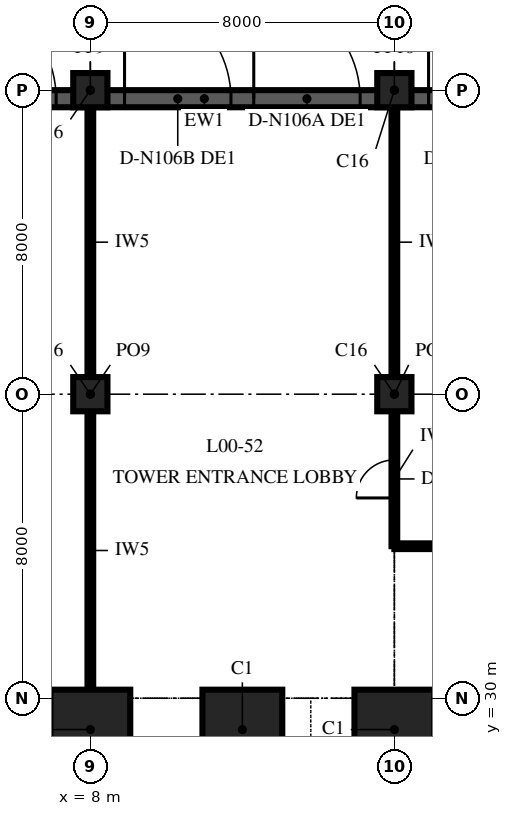
"""IFC4 building model, lengths in metres.
Left out: names, types, materials, properties, quantities, classifications, styles, units other than length and angle.
Written with IfcOpenShell. Run it as: python <this file> out.ifc"""

import sys

from ifc_helpers import new_model, si_unit, direction, frame, frame_2d, origin, origin_2d, place, context, subcontext, project, spatial, rectangle, extrude, element, fill, save


model = new_model("IFC4")
c1 = context("Model", 3, precision=1e-05, world=origin(), true_north=direction((0.0, 1.0)))
c2 = subcontext(c1, "Body", "Model", "MODEL_VIEW")
j1 = project(units=[si_unit("LENGTHUNIT", "METRE"), si_unit("PLANEANGLEUNIT", "RADIAN")], contexts=[c1])
p1 = place(None, origin())
s1 = spatial("IfcSite", under=j1, at=p1, CompositionType="ELEMENT")
p2 = place(p1, origin())
s2 = spatial("IfcBuilding", under=s1, at=p2, CompositionType="ELEMENT")
p3 = place(p2, origin())
s3 = spatial("IfcBuildingStorey", under=s2, at=p3, CompositionType="ELEMENT", Elevation=0.0)
for number, where, z_axis, x_axis in (
    (1, (16.0, 29.175, 0.0), (0.0, 0.0, 1.0), (-1.0, 0.0, 0.0)),
    (2, (12.0, 29.175, 0.0), (0.0, 0.0, 1.0), (-1.0, 0.0, 0.0)),
    (3, (8.0, 29.175, 0.0), (0.0, 0.0, 1.0), (-1.0, 0.0, 0.0)),
):
    element("IfcColumn", number, at=place(p3, frame(where, z_axis=z_axis, x_axis=x_axis)), inside=s3, PredefinedType="COLUMN", context=c2, shape_type="SweptSolid", body=[
        extrude(rectangle(XDim=2.1, YDim=2.1, at=origin_2d()), origin(), (0.0, 0.0, 1.0), 6.0),
    ])
for number, where, z_axis, x_axis in (
    (4, (8.0, 38.0, 0.0), (0.0, 0.0, 1.0), (1.0, 0.0, 0.0)),
    (5, (8.0, 46.0, 0.0), (0.0, 0.0, 1.0), (1.0, 0.0, 0.0)),
    (6, (16.0, 38.0, 0.0), (0.0, 0.0, 1.0), (1.0, 0.0, 0.0)),
    (7, (16.0, 46.0, 0.0), (0.0, 0.0, 1.0), (1.0, 0.0, 0.0)),
):
    element("IfcColumn", number, at=place(p3, frame(where, z_axis=z_axis, x_axis=x_axis)), inside=s3, PredefinedType="COLUMN", context=c2, shape_type="SweptSolid", body=[
        extrude(rectangle(XDim=0.9, YDim=0.9, at=origin_2d()), origin(), (0.0, 0.0, 1.0), 6.0),
    ])
p4 = place(p3, frame((56.0, 45.775, 0.0), z_axis=(0.0, 0.0, 1.0), x_axis=(-1.0, 0.0, 0.0)))
e8 = element("IfcWall", 8, at=p4, inside=s3, PredefinedType="SOLIDWALL", context=c2, shape_type="SweptSolid", body=[
    extrude(rectangle(XDim=90.0, YDim=0.45, at=frame_2d((45.0, 0.0))), origin(), (0.0, 0.0, 1.0), 6.0),
])
p5 = place(p4, frame((0.9, 0.0, 0.0)))
e9 = element("IfcOpeningElement", 9, at=p5, cuts=e8, PredefinedType="OPENING", context=c2, shape_type="SweptSolid", body=[
    extrude(rectangle(XDim=2.8, YDim=2.4, at=frame_2d((1.4, 1.2))), frame((0.0, 0.24, 0.0), z_axis=(0.0, -1.0, 0.0), x_axis=(1.0, 0.0, 0.0)), (0.0, 0.0, 1.0), 0.48),
])
p6 = place(p4, frame((4.3, 0.0, 0.0)))
e10 = element("IfcOpeningElement", 10, at=p6, cuts=e8, PredefinedType="OPENING", context=c2, shape_type="SweptSolid", body=[
    extrude(rectangle(XDim=2.8, YDim=2.4, at=frame_2d((1.4, 1.2))), frame((0.0, 0.24, 0.0), z_axis=(0.0, -1.0, 0.0), x_axis=(1.0, 0.0, 0.0)), (0.0, 0.0, 1.0), 0.48),
])
p7 = place(p4, frame((8.9, 0.0, 0.0)))
e11 = element("IfcOpeningElement", 11, at=p7, cuts=e8, PredefinedType="OPENING", context=c2, shape_type="SweptSolid", body=[
    extrude(rectangle(XDim=2.8, YDim=2.4, at=frame_2d((1.4, 1.2))), frame((0.0, 0.24, 0.0), z_axis=(0.0, -1.0, 0.0), x_axis=(1.0, 0.0, 0.0)), (0.0, 0.0, 1.0), 0.48),
])
p8 = place(p4, frame((12.3, 0.0, 0.0)))
e12 = element("IfcOpeningElement", 12, at=p8, cuts=e8, PredefinedType="OPENING", context=c2, shape_type="SweptSolid", body=[
    extrude(rectangle(XDim=2.8, YDim=2.4, at=frame_2d((1.4, 1.2))), frame((0.0, 0.24, 0.0), z_axis=(0.0, -1.0, 0.0), x_axis=(1.0, 0.0, 0.0)), (0.0, 0.0, 1.0), 0.48),
])
p9 = place(p4, frame((16.9, 0.0, 0.0)))
e13 = element("IfcOpeningElement", 13, at=p9, cuts=e8, PredefinedType="OPENING", context=c2, shape_type="SweptSolid", body=[
    extrude(rectangle(XDim=2.8, YDim=2.4, at=frame_2d((1.4, 1.2))), frame((0.0, 0.24, 0.0), z_axis=(0.0, -1.0, 0.0), x_axis=(1.0, 0.0, 0.0)), (0.0, 0.0, 1.0), 0.48),
])
p10 = place(p4, frame((20.3, 0.0, 0.0)))
e14 = element("IfcOpeningElement", 14, at=p10, cuts=e8, PredefinedType="OPENING", context=c2, shape_type="SweptSolid", body=[
    extrude(rectangle(XDim=2.8, YDim=2.4, at=frame_2d((1.4, 1.2))), frame((0.0, 0.24, 0.0), z_axis=(0.0, -1.0, 0.0), x_axis=(1.0, 0.0, 0.0)), (0.0, 0.0, 1.0), 0.48),
])
p11 = place(p4, frame((24.9, 0.0, 0.0)))
e15 = element("IfcOpeningElement", 15, at=p11, cuts=e8, PredefinedType="OPENING", context=c2, shape_type="SweptSolid", body=[
    extrude(rectangle(XDim=2.8, YDim=2.4, at=frame_2d((1.4, 1.2))), frame((0.0, 0.24, 0.0), z_axis=(0.0, -1.0, 0.0), x_axis=(1.0, 0.0, 0.0)), (0.0, 0.0, 1.0), 0.48),
])
p12 = place(p4, frame((28.3, 0.0, 0.0)))
e16 = element("IfcOpeningElement", 16, at=p12, cuts=e8, PredefinedType="OPENING", context=c2, shape_type="SweptSolid", body=[
    extrude(rectangle(XDim=2.8, YDim=2.4, at=frame_2d((1.4, 1.2))), frame((0.0, 0.24, 0.0), z_axis=(0.0, -1.0, 0.0), x_axis=(1.0, 0.0, 0.0)), (0.0, 0.0, 1.0), 0.48),
])
p13 = place(p4, frame((32.9, 0.0, 0.0)))
e17 = element("IfcOpeningElement", 17, at=p13, cuts=e8, PredefinedType="OPENING", context=c2, shape_type="SweptSolid", body=[
    extrude(rectangle(XDim=2.8, YDim=2.4, at=frame_2d((1.4, 1.2))), frame((0.0, 0.24, 0.0), z_axis=(0.0, -1.0, 0.0), x_axis=(1.0, 0.0, 0.0)), (0.0, 0.0, 1.0), 0.48),
])
p14 = place(p4, frame((36.3, 0.0, 0.0)))
e18 = element("IfcOpeningElement", 18, at=p14, cuts=e8, PredefinedType="OPENING", context=c2, shape_type="SweptSolid", body=[
    extrude(rectangle(XDim=2.8, YDim=2.4, at=frame_2d((1.4, 1.2))), frame((0.0, 0.24, 0.0), z_axis=(0.0, -1.0, 0.0), x_axis=(1.0, 0.0, 0.0)), (0.0, 0.0, 1.0), 0.48),
])
p15 = place(p4, frame((40.9, 0.0, 0.0)))
e19 = element("IfcOpeningElement", 19, at=p15, cuts=e8, PredefinedType="OPENING", context=c2, shape_type="SweptSolid", body=[
    extrude(rectangle(XDim=2.8, YDim=2.4, at=frame_2d((1.4, 1.2))), frame((0.0, 0.24, 0.0), z_axis=(0.0, -1.0, 0.0), x_axis=(1.0, 0.0, 0.0)), (0.0, 0.0, 1.0), 0.48),
])
p16 = place(p4, frame((44.3, 0.0, 0.0)))
e20 = element("IfcOpeningElement", 20, at=p16, cuts=e8, PredefinedType="OPENING", context=c2, shape_type="SweptSolid", body=[
    extrude(rectangle(XDim=2.8, YDim=2.4, at=frame_2d((1.4, 1.2))), frame((0.0, 0.24, 0.0), z_axis=(0.0, -1.0, 0.0), x_axis=(1.0, 0.0, 0.0)), (0.0, 0.0, 1.0), 0.48),
])
p17 = place(p4, frame((48.9, 0.0, 0.0)))
e21 = element("IfcOpeningElement", 21, at=p17, cuts=e8, PredefinedType="OPENING", context=c2, shape_type="SweptSolid", body=[
    extrude(rectangle(XDim=2.8, YDim=2.4, at=frame_2d((1.4, 1.2))), frame((0.0, 0.24, 0.0), z_axis=(0.0, -1.0, 0.0), x_axis=(1.0, 0.0, 0.0)), (0.0, 0.0, 1.0), 0.48),
])
p18 = place(p4, frame((52.3, 0.0, 0.0)))
e22 = element("IfcOpeningElement", 22, at=p18, cuts=e8, PredefinedType="OPENING", context=c2, shape_type="SweptSolid", body=[
    extrude(rectangle(XDim=2.8, YDim=2.4, at=frame_2d((1.4, 1.2))), frame((0.0, 0.24, 0.0), z_axis=(0.0, -1.0, 0.0), x_axis=(1.0, 0.0, 0.0)), (0.0, 0.0, 1.0), 0.48),
])
p19 = place(p4, frame((56.9, 0.0, 0.0)))
e23 = element("IfcOpeningElement", 23, at=p19, cuts=e8, PredefinedType="OPENING", context=c2, shape_type="SweptSolid", body=[
    extrude(rectangle(XDim=2.8, YDim=2.4, at=frame_2d((1.4, 1.2))), frame((0.0, 0.24, 0.0), z_axis=(0.0, -1.0, 0.0), x_axis=(1.0, 0.0, 0.0)), (0.0, 0.0, 1.0), 0.48),
])
p20 = place(p4, frame((60.3, 0.0, 0.0)))
e24 = element("IfcOpeningElement", 24, at=p20, cuts=e8, PredefinedType="OPENING", context=c2, shape_type="SweptSolid", body=[
    extrude(rectangle(XDim=2.8, YDim=2.4, at=frame_2d((1.4, 1.2))), frame((0.0, 0.24, 0.0), z_axis=(0.0, -1.0, 0.0), x_axis=(1.0, 0.0, 0.0)), (0.0, 0.0, 1.0), 0.48),
])
p21 = place(p4, frame((64.9, 0.0, 0.0)))
e25 = element("IfcOpeningElement", 25, at=p21, cuts=e8, PredefinedType="OPENING", context=c2, shape_type="SweptSolid", body=[
    extrude(rectangle(XDim=2.8, YDim=2.4, at=frame_2d((1.4, 1.2))), frame((0.0, 0.24, 0.0), z_axis=(0.0, -1.0, 0.0), x_axis=(1.0, 0.0, 0.0)), (0.0, 0.0, 1.0), 0.48),
])
p22 = place(p4, frame((68.3, 0.0, 0.0)))
e26 = element("IfcOpeningElement", 26, at=p22, cuts=e8, PredefinedType="OPENING", context=c2, shape_type="SweptSolid", body=[
    extrude(rectangle(XDim=2.8, YDim=2.4, at=frame_2d((1.4, 1.2))), frame((0.0, 0.24, 0.0), z_axis=(0.0, -1.0, 0.0), x_axis=(1.0, 0.0, 0.0)), (0.0, 0.0, 1.0), 0.48),
])
p23 = place(p4, frame((72.9, 0.0, 0.0)))
e27 = element("IfcOpeningElement", 27, at=p23, cuts=e8, PredefinedType="OPENING", context=c2, shape_type="SweptSolid", body=[
    extrude(rectangle(XDim=2.8, YDim=2.4, at=frame_2d((1.4, 1.2))), frame((0.0, 0.24, 0.0), z_axis=(0.0, -1.0, 0.0), x_axis=(1.0, 0.0, 0.0)), (0.0, 0.0, 1.0), 0.48),
])
p24 = place(p4, frame((76.3, 0.0, 0.0)))
e28 = element("IfcOpeningElement", 28, at=p24, cuts=e8, PredefinedType="OPENING", context=c2, shape_type="SweptSolid", body=[
    extrude(rectangle(XDim=2.8, YDim=2.4, at=frame_2d((1.4, 1.2))), frame((0.0, 0.24, 0.0), z_axis=(0.0, -1.0, 0.0), x_axis=(1.0, 0.0, 0.0)), (0.0, 0.0, 1.0), 0.48),
])
p25 = place(p4, frame((80.9, 0.0, 0.0)))
e29 = element("IfcOpeningElement", 29, at=p25, cuts=e8, PredefinedType="OPENING", context=c2, shape_type="SweptSolid", body=[
    extrude(rectangle(XDim=2.8, YDim=2.4, at=frame_2d((1.4, 1.2))), frame((0.0, 0.24, 0.0), z_axis=(0.0, -1.0, 0.0), x_axis=(1.0, 0.0, 0.0)), (0.0, 0.0, 1.0), 0.48),
])
p26 = place(p4, frame((84.3, 0.0, 0.0)))
e30 = element("IfcOpeningElement", 30, at=p26, cuts=e8, PredefinedType="OPENING", context=c2, shape_type="SweptSolid", body=[
    extrude(rectangle(XDim=2.8, YDim=2.4, at=frame_2d((1.4, 1.2))), frame((0.0, 0.24, 0.0), z_axis=(0.0, -1.0, 0.0), x_axis=(1.0, 0.0, 0.0)), (0.0, 0.0, 1.0), 0.48),
])
p27 = place(p3, frame((16.0, 34.0, 0.0), z_axis=(0.0, 0.0, 1.0), x_axis=(0.0, 1.0, 0.0)))
e31 = element("IfcWall", 31, at=p27, inside=s3, PredefinedType="PARTITIONING", context=c2, shape_type="SweptSolid", body=[
    extrude(rectangle(XDim=3.54, YDim=0.15, at=frame_2d((1.77, 0.0))), origin(), (0.0, 0.0, 1.0), 5.7),
])
p28 = place(p27, frame((1.27, 0.0, 0.0)))
e32 = element("IfcOpeningElement", 32, at=p28, cuts=e31, PredefinedType="OPENING", context=c2, shape_type="SweptSolid", body=[
    extrude(rectangle(XDim=1.0, YDim=2.1, at=frame_2d((0.5, 1.05))), frame((0.0, 0.09, 0.0), z_axis=(0.0, -1.0, 0.0), x_axis=(1.0, 0.0, 0.0)), (0.0, 0.0, 1.0), 0.18),
])
p29 = place(p3, frame((16.0, 38.46, 0.0), z_axis=(0.0, 0.0, 1.0), x_axis=(0.0, 1.0, 0.0)))
e33 = element("IfcWall", 33, at=p29, inside=s3, PredefinedType="PARTITIONING", context=c2, shape_type="SweptSolid", body=[
    extrude(rectangle(XDim=7.08, YDim=0.15, at=frame_2d((3.54, 0.0))), origin(), (0.0, 0.0, 1.0), 5.05),
])
p30 = place(p3, frame((16.0, 34.0, 0.0), z_axis=(0.0, 0.0, 1.0), x_axis=(1.0, 0.0, 0.0)))
e34 = element("IfcWall", 34, at=p30, inside=s3, PredefinedType="PARTITIONING", context=c2, shape_type="SweptSolid", body=[
    extrude(rectangle(XDim=28.0, YDim=0.15, at=frame_2d((14.0, 0.0))), origin(), (0.0, 0.0, 1.0), 5.7),
])
p31 = place(p3, frame((8.0, 30.235, 0.0), z_axis=(0.0, 0.0, 1.0), x_axis=(0.0, 1.0, 0.0)))
e35 = element("IfcWall", 35, at=p31, inside=s3, PredefinedType="PARTITIONING", context=c2, shape_type="SweptSolid", body=[
    extrude(rectangle(XDim=7.305, YDim=0.15, at=frame_2d((3.652, 0.0))), origin(), (0.0, 0.0, 1.0), 5.7),
])
p32 = place(p3, frame((8.0, 38.46, 0.0), z_axis=(0.0, 0.0, 1.0), x_axis=(0.0, 1.0, 0.0)))
e36 = element("IfcWall", 36, at=p32, inside=s3, PredefinedType="PARTITIONING", context=c2, shape_type="SweptSolid", body=[
    extrude(rectangle(XDim=7.08, YDim=0.15, at=frame_2d((3.54, 0.0))), origin(), (0.0, 0.0, 1.0), 5.05),
])
p33 = place(p14, frame((2.8, 0.0, 0.0), z_axis=(0.0, 0.0, 1.0), x_axis=(-1.0, 0.0, 0.0)))
e37 = element("IfcDoor", 37, at=p33, inside=s3, OperationType="DOUBLE_DOOR_SINGLE_SWING", PredefinedType="DOOR", context=c2, shape_type="SweptSolid", body=[
    extrude(rectangle(XDim=2.8, YDim=2.4, at=frame_2d((1.4, 1.2))), frame((0.0, 0.225, 0.0), z_axis=(0.0, -1.0, 0.0), x_axis=(1.0, 0.0, 0.0)), (0.0, 0.0, 1.0), 0.449),
])
fill(e18, e37)
p34 = place(p15, frame((2.8, 0.0, 0.0), z_axis=(0.0, 0.0, 1.0), x_axis=(-1.0, 0.0, 0.0)))
e38 = element("IfcDoor", 38, at=p34, inside=s3, OperationType="DOUBLE_DOOR_SINGLE_SWING", PredefinedType="DOOR", context=c2, shape_type="SweptSolid", body=[
    extrude(rectangle(XDim=2.8, YDim=2.4, at=frame_2d((1.4, 1.2))), frame((0.0, 0.225, 0.0), z_axis=(0.0, -1.0, 0.0), x_axis=(1.0, 0.0, 0.0)), (0.0, 0.0, 1.0), 0.449),
])
fill(e19, e38)
p35 = place(p16, frame((2.8, 0.0, 0.0), z_axis=(0.0, 0.0, 1.0), x_axis=(-1.0, 0.0, 0.0)))
e39 = element("IfcDoor", 39, at=p35, inside=s3, OperationType="DOUBLE_DOOR_SINGLE_SWING", PredefinedType="DOOR", context=c2, shape_type="SweptSolid", body=[
    extrude(rectangle(XDim=2.8, YDim=2.4, at=frame_2d((1.4, 1.2))), frame((0.0, 0.225, 0.0), z_axis=(0.0, -1.0, 0.0), x_axis=(1.0, 0.0, 0.0)), (0.0, 0.0, 1.0), 0.449),
])
fill(e20, e39)
p36 = place(p17, frame((2.8, 0.0, 0.0), z_axis=(0.0, 0.0, 1.0), x_axis=(-1.0, 0.0, 0.0)))
e40 = element("IfcDoor", 40, at=p36, inside=s3, OperationType="DOUBLE_DOOR_SINGLE_SWING", PredefinedType="DOOR", context=c2, shape_type="SweptSolid", body=[
    extrude(rectangle(XDim=2.8, YDim=2.4, at=frame_2d((1.4, 1.2))), frame((0.0, 0.225, 0.0), z_axis=(0.0, -1.0, 0.0), x_axis=(1.0, 0.0, 0.0)), (0.0, 0.0, 1.0), 0.449),
])
fill(e21, e40)
p37 = place(p28, origin())
e41 = element("IfcDoor", 41, at=p37, inside=s3, OperationType="SINGLE_SWING_LEFT", PredefinedType="DOOR", context=c2, shape_type="SweptSolid", body=[
    extrude(rectangle(XDim=1.0, YDim=2.1, at=frame_2d((0.5, 1.05))), frame((0.0, 0.075, 0.0), z_axis=(0.0, -1.0, 0.0), x_axis=(1.0, 0.0, 0.0)), (0.0, 0.0, 1.0), 0.149),
])
fill(e32, e41)
save(model, sys.argv[1])
